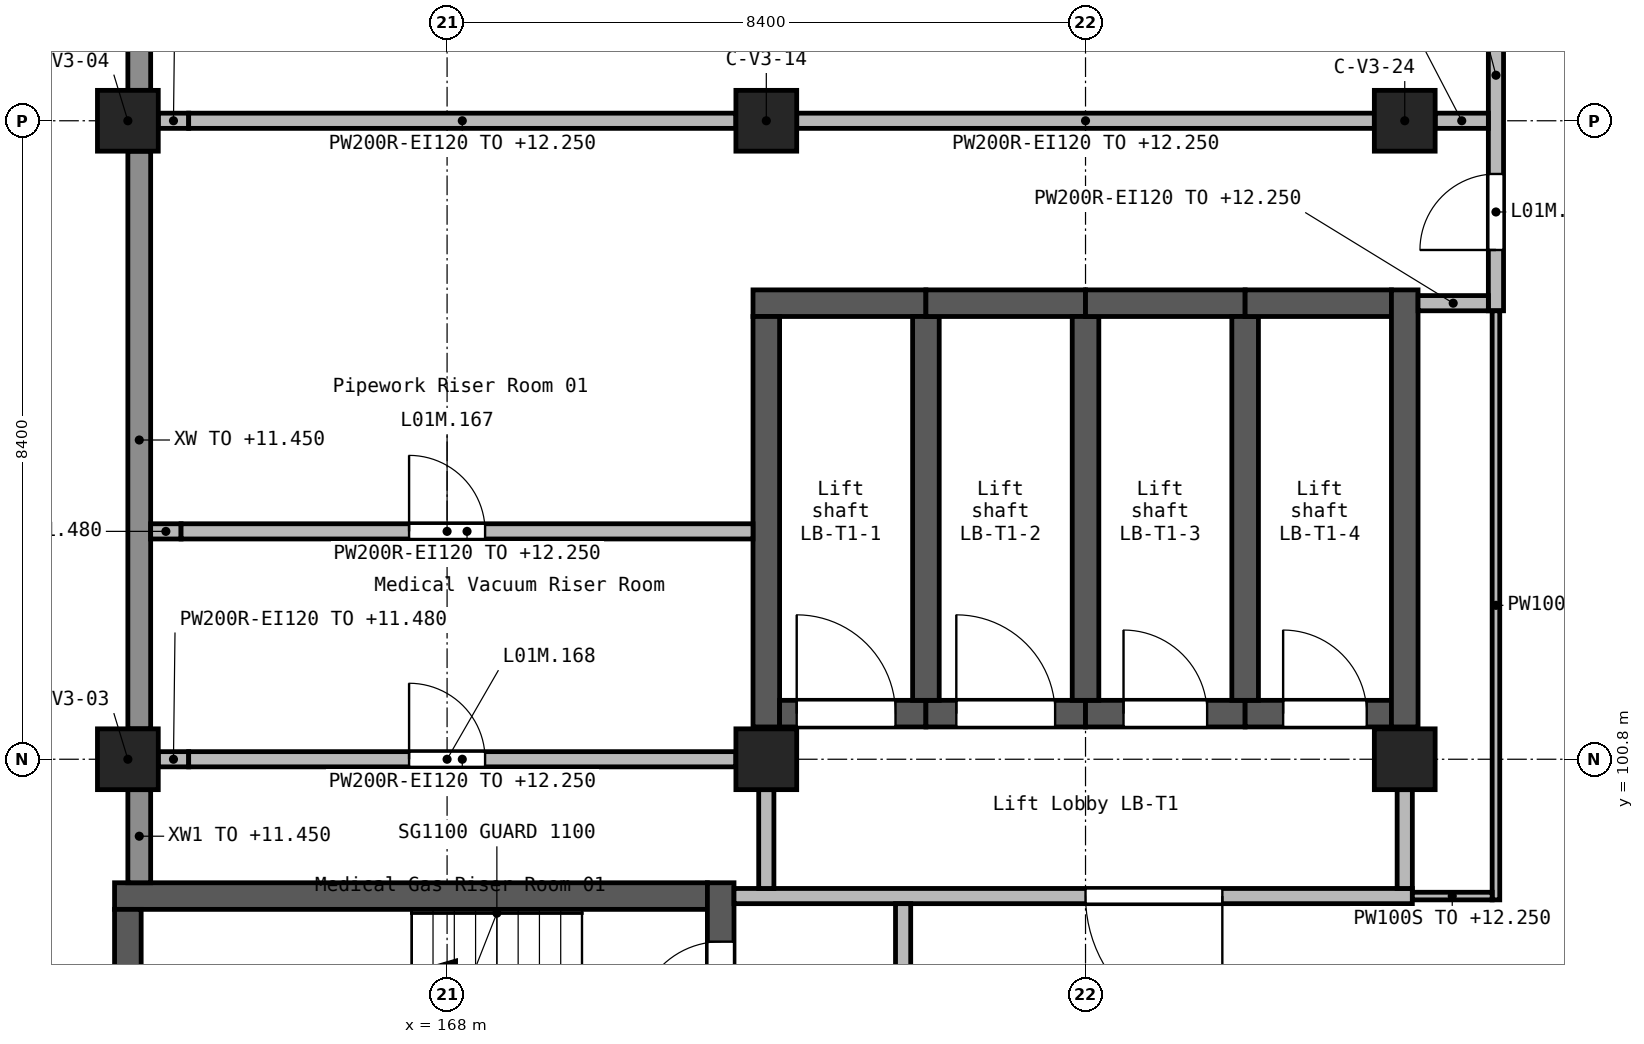
"""IFC4 building model, lengths in metres.
Left out: names, types, materials, properties, quantities, classifications, styles, units other than length and angle.
Written with IfcOpenShell. Run it as: python <this file> out.ifc"""

import sys

from ifc_helpers import new_model, si_unit, direction, frame, frame_2d, origin, origin_2d, place, context, subcontext, project, spatial, rectangle, extrude, element, fill, save


model = new_model("IFC4")
c1 = context("Model", 3, precision=1e-05, world=origin(), true_north=direction((0.0, 1.0)))
c2 = subcontext(c1, "Body", "Model", "MODEL_VIEW")
j1 = project(units=[si_unit("LENGTHUNIT", "METRE"), si_unit("PLANEANGLEUNIT", "RADIAN")], contexts=[c1])
p1 = place(None, origin())
s1 = spatial("IfcSite", under=j1, at=p1, CompositionType="ELEMENT")
p2 = place(p1, origin())
s2 = spatial("IfcBuilding", under=s1, at=p2, CompositionType="ELEMENT")
p3 = place(p2, frame((0.0, 0.0, 9.9)))
s3 = spatial("IfcBuildingStorey", under=s2, at=p3, CompositionType="ELEMENT", Elevation=9.9)
for number, where, z_axis, x_axis in (
    (1, (163.8, 100.8, 0.0), (0.0, 0.0, 1.0), (1.0, 0.0, 0.0)),
    (2, (163.8, 109.2, 0.0), (0.0, 0.0, 1.0), (1.0, 0.0, 0.0)),
    (3, (172.2, 100.8, 0.0), (0.0, 0.0, 1.0), (1.0, 0.0, 0.0)),
    (4, (172.2, 109.2, 0.0), (0.0, 0.0, 1.0), (1.0, 0.0, 0.0)),
    (5, (180.6, 100.8, 0.0), (0.0, 0.0, 1.0), (1.0, 0.0, 0.0)),
    (6, (180.6, 109.2, 0.0), (0.0, 0.0, 1.0), (1.0, 0.0, 0.0)),
):
    element("IfcColumn", number, at=place(p3, frame(where, z_axis=z_axis, x_axis=x_axis)), inside=s3, PredefinedType="COLUMN", context=c2, shape_type="SweptSolid", body=[
        extrude(rectangle(XDim=0.8, YDim=0.8, at=origin_2d()), origin(), (0.0, 0.0, 1.0), 2.7),
    ])
p4 = place(p3, frame((163.625, 99.0, 0.0), z_axis=(0.0, 0.0, 1.0), x_axis=(1.0, 0.0, 0.0)))
e7 = element("IfcWall", 7, at=p4, inside=s3, PredefinedType="SHEAR", context=c2, shape_type="SweptSolid", body=[
    extrude(rectangle(XDim=7.8, YDim=0.35, at=frame_2d((3.9, 0.0))), origin(), (0.0, 0.0, 1.0), 2.7),
])
p5 = place(p3, frame((163.8, 94.025, 0.0), z_axis=(0.0, 0.0, 1.0), x_axis=(0.0, 1.0, 0.0)))
e8 = element("IfcWall", 8, at=p5, inside=s3, PredefinedType="SHEAR", context=c2, shape_type="SweptSolid", body=[
    extrude(rectangle(XDim=4.8, YDim=0.35, at=frame_2d((2.4, 0.0))), origin(), (0.0, 0.0, 1.0), 2.7),
])
p6 = place(p3, frame((171.6, 94.025, 0.0), z_axis=(0.0, 0.0, 1.0), x_axis=(0.0, 1.0, 0.0)))
e9 = element("IfcWall", 9, at=p6, inside=s3, PredefinedType="SHEAR", context=c2, shape_type="SweptSolid", body=[
    extrude(rectangle(XDim=5.15, YDim=0.35, at=frame_2d((2.575, 0.0))), origin(), (0.0, 0.0, 1.0), 2.7),
])
p7 = place(p6, frame((3.275, 0.0, 0.0)))
e10 = element("IfcOpeningElement", 10, at=p7, cuts=e9, PredefinedType="OPENING", context=c2, shape_type="SweptSolid", body=[
    extrude(rectangle(XDim=1.1, YDim=2.1, at=frame_2d((0.55, 1.05))), frame((0.0, 0.185, 0.0), z_axis=(0.0, -1.0, 0.0), x_axis=(1.0, 0.0, 0.0)), (0.0, 0.0, 1.0), 0.37),
])
p8 = place(p3, frame((172.025, 106.8, 0.0), z_axis=(0.0, 0.0, 1.0), x_axis=(1.0, 0.0, 0.0)))
e11 = element("IfcWall", 11, at=p8, inside=s3, PredefinedType="SHEAR", context=c2, shape_type="SweptSolid", body=[
    extrude(rectangle(XDim=2.275, YDim=0.35, at=frame_2d((1.138, 0.0))), origin(), (0.0, 0.0, 1.0), 2.7),
])
p9 = place(p3, frame((172.2, 101.225, 0.0), z_axis=(0.0, 0.0, 1.0), x_axis=(0.0, 1.0, 0.0)))
e12 = element("IfcWall", 12, at=p9, inside=s3, PredefinedType="SHEAR", context=c2, shape_type="SweptSolid", body=[
    extrude(rectangle(XDim=5.4, YDim=0.35, at=frame_2d((2.7, 0.0))), origin(), (0.0, 0.0, 1.0), 2.7),
])
p10 = place(p3, frame((172.375, 101.4, 0.0), z_axis=(0.0, 0.0, 1.0), x_axis=(1.0, 0.0, 0.0)))
e13 = element("IfcWall", 13, at=p10, inside=s3, PredefinedType="SHEAR", context=c2, shape_type="SweptSolid", body=[
    extrude(rectangle(XDim=1.925, YDim=0.35, at=frame_2d((0.962, 0.0))), origin(), (0.0, 0.0, 1.0), 2.7),
])
p11 = place(p10, frame((0.225, 0.0, 0.0)))
e14 = element("IfcOpeningElement", 14, at=p11, cuts=e13, PredefinedType="OPENING", context=c2, shape_type="SweptSolid", body=[
    extrude(rectangle(XDim=1.3, YDim=2.1, at=frame_2d((0.65, 1.05))), frame((0.0, 0.185, 0.0), z_axis=(0.0, -1.0, 0.0), x_axis=(1.0, 0.0, 0.0)), (0.0, 0.0, 1.0), 0.37),
])
p12 = place(p3, frame((174.3, 101.4, 0.0), z_axis=(0.0, 0.0, 1.0), x_axis=(1.0, 0.0, 0.0)))
e15 = element("IfcWall", 15, at=p12, inside=s3, PredefinedType="SHEAR", context=c2, shape_type="SweptSolid", body=[
    extrude(rectangle(XDim=2.1, YDim=0.35, at=frame_2d((1.05, 0.0))), origin(), (0.0, 0.0, 1.0), 2.7),
])
p13 = place(p12, frame((0.4, 0.0, 0.0)))
e16 = element("IfcOpeningElement", 16, at=p13, cuts=e15, PredefinedType="OPENING", context=c2, shape_type="SweptSolid", body=[
    extrude(rectangle(XDim=1.3, YDim=2.1, at=frame_2d((0.65, 1.05))), frame((0.0, 0.185, 0.0), z_axis=(0.0, -1.0, 0.0), x_axis=(1.0, 0.0, 0.0)), (0.0, 0.0, 1.0), 0.37),
])
p14 = place(p3, frame((174.3, 101.575, 0.0), z_axis=(0.0, 0.0, 1.0), x_axis=(0.0, 1.0, 0.0)))
e17 = element("IfcWall", 17, at=p14, inside=s3, PredefinedType="SHEAR", context=c2, shape_type="SweptSolid", body=[
    extrude(rectangle(XDim=5.05, YDim=0.35, at=frame_2d((2.525, 0.0))), origin(), (0.0, 0.0, 1.0), 2.7),
])
p15 = place(p3, frame((174.3, 106.8, 0.0), z_axis=(0.0, 0.0, 1.0), x_axis=(1.0, 0.0, 0.0)))
e18 = element("IfcWall", 18, at=p15, inside=s3, PredefinedType="SHEAR", context=c2, shape_type="SweptSolid", body=[
    extrude(rectangle(XDim=2.1, YDim=0.35, at=frame_2d((1.05, 0.0))), origin(), (0.0, 0.0, 1.0), 2.7),
])
p16 = place(p3, frame((176.4, 101.4, 0.0), z_axis=(0.0, 0.0, 1.0), x_axis=(1.0, 0.0, 0.0)))
e19 = element("IfcWall", 19, at=p16, inside=s3, PredefinedType="SHEAR", context=c2, shape_type="SweptSolid", body=[
    extrude(rectangle(XDim=2.1, YDim=0.35, at=frame_2d((1.05, 0.0))), origin(), (0.0, 0.0, 1.0), 2.7),
])
p17 = place(p16, frame((0.5, 0.0, 0.0)))
e20 = element("IfcOpeningElement", 20, at=p17, cuts=e19, PredefinedType="OPENING", context=c2, shape_type="SweptSolid", body=[
    extrude(rectangle(XDim=1.1, YDim=2.1, at=frame_2d((0.55, 1.05))), frame((0.0, 0.185, 0.0), z_axis=(0.0, -1.0, 0.0), x_axis=(1.0, 0.0, 0.0)), (0.0, 0.0, 1.0), 0.37),
])
p18 = place(p3, frame((176.4, 101.575, 0.0), z_axis=(0.0, 0.0, 1.0), x_axis=(0.0, 1.0, 0.0)))
e21 = element("IfcWall", 21, at=p18, inside=s3, PredefinedType="SHEAR", context=c2, shape_type="SweptSolid", body=[
    extrude(rectangle(XDim=5.05, YDim=0.35, at=frame_2d((2.525, 0.0))), origin(), (0.0, 0.0, 1.0), 2.7),
])
p19 = place(p3, frame((176.4, 106.8, 0.0), z_axis=(0.0, 0.0, 1.0), x_axis=(1.0, 0.0, 0.0)))
e22 = element("IfcWall", 22, at=p19, inside=s3, PredefinedType="SHEAR", context=c2, shape_type="SweptSolid", body=[
    extrude(rectangle(XDim=2.1, YDim=0.35, at=frame_2d((1.05, 0.0))), origin(), (0.0, 0.0, 1.0), 2.7),
])
p20 = place(p3, frame((178.5, 101.4, 0.0), z_axis=(0.0, 0.0, 1.0), x_axis=(1.0, 0.0, 0.0)))
e23 = element("IfcWall", 23, at=p20, inside=s3, PredefinedType="SHEAR", context=c2, shape_type="SweptSolid", body=[
    extrude(rectangle(XDim=1.925, YDim=0.35, at=frame_2d((0.962, 0.0))), origin(), (0.0, 0.0, 1.0), 2.7),
])
p21 = place(p20, frame((0.5, 0.0, 0.0)))
e24 = element("IfcOpeningElement", 24, at=p21, cuts=e23, PredefinedType="OPENING", context=c2, shape_type="SweptSolid", body=[
    extrude(rectangle(XDim=1.1, YDim=2.1, at=frame_2d((0.55, 1.05))), frame((0.0, 0.185, 0.0), z_axis=(0.0, -1.0, 0.0), x_axis=(1.0, 0.0, 0.0)), (0.0, 0.0, 1.0), 0.37),
])
p22 = place(p3, frame((178.5, 101.575, 0.0), z_axis=(0.0, 0.0, 1.0), x_axis=(0.0, 1.0, 0.0)))
e25 = element("IfcWall", 25, at=p22, inside=s3, PredefinedType="SHEAR", context=c2, shape_type="SweptSolid", body=[
    extrude(rectangle(XDim=5.05, YDim=0.35, at=frame_2d((2.525, 0.0))), origin(), (0.0, 0.0, 1.0), 2.7),
])
p23 = place(p3, frame((178.5, 106.8, 0.0), z_axis=(0.0, 0.0, 1.0), x_axis=(1.0, 0.0, 0.0)))
e26 = element("IfcWall", 26, at=p23, inside=s3, PredefinedType="SHEAR", context=c2, shape_type="SweptSolid", body=[
    extrude(rectangle(XDim=1.925, YDim=0.35, at=frame_2d((0.962, 0.0))), origin(), (0.0, 0.0, 1.0), 2.7),
])
p24 = place(p3, frame((180.6, 101.225, 0.0), z_axis=(0.0, 0.0, 1.0), x_axis=(0.0, 1.0, 0.0)))
e27 = element("IfcWall", 27, at=p24, inside=s3, PredefinedType="SHEAR", context=c2, shape_type="SweptSolid", body=[
    extrude(rectangle(XDim=5.75, YDim=0.35, at=frame_2d((2.875, 0.0))), origin(), (0.0, 0.0, 1.0), 2.7),
])
p25 = place(p3, frame((163.95, 117.54, 0.0), z_axis=(0.0, 0.0, 1.0), x_axis=(0.0, -1.0, 0.0)))
e28 = element("IfcWall", 28, at=p25, inside=s3, PredefinedType="STANDARD", context=c2, shape_type="SweptSolid", body=[
    extrude(rectangle(XDim=7.94, YDim=0.3, at=frame_2d((3.97, 0.0))), origin(), (0.0, 0.0, 1.0), 1.55),
])
p26 = place(p3, frame((163.95, 108.8, 0.0), z_axis=(0.0, 0.0, 1.0), x_axis=(0.0, -1.0, 0.0)))
e29 = element("IfcWall", 29, at=p26, inside=s3, PredefinedType="STANDARD", context=c2, shape_type="SweptSolid", body=[
    extrude(rectangle(XDim=7.6, YDim=0.3, at=frame_2d((3.8, 0.0))), origin(), (0.0, 0.0, 1.0), 1.55),
])
p27 = place(p3, frame((163.95, 100.4, 0.0), z_axis=(0.0, 0.0, 1.0), x_axis=(0.0, -1.0, 0.0)))
e30 = element("IfcWall", 30, at=p27, inside=s3, PredefinedType="STANDARD", context=c2, shape_type="SweptSolid", body=[
    extrude(rectangle(XDim=1.225, YDim=0.3, at=frame_2d((0.612, 0.0))), origin(), (0.0, 0.0, 1.0), 1.55),
])
p28 = place(p3, frame((181.8, 106.7, 0.0), z_axis=(0.0, 0.0, 1.0), x_axis=(0.0, 1.0, 0.0)))
e31 = element("IfcWall", 31, at=p28, inside=s3, PredefinedType="SOLIDWALL", context=c2, shape_type="SweptSolid", body=[
    extrude(rectangle(XDim=6.198, YDim=0.2, at=frame_2d((3.099, 0.0))), origin(), (0.0, 0.0, 1.0), 2.35),
])
p29 = place(p28, frame((0.8, 0.0, 0.0)))
e32 = element("IfcOpeningElement", 32, at=p29, cuts=e31, PredefinedType="OPENING", context=c2, shape_type="SweptSolid", body=[
    extrude(rectangle(XDim=1.0, YDim=2.1, at=frame_2d((0.5, 1.05))), frame((0.0, 0.11, 0.0), z_axis=(0.0, -1.0, 0.0), x_axis=(1.0, 0.0, 0.0)), (0.0, 0.0, 1.0), 0.22),
])
p30 = place(p28, frame((3.799, 0.0, 0.0)))
e33 = element("IfcOpeningElement", 33, at=p30, cuts=e31, PredefinedType="OPENING", context=c2, shape_type="SweptSolid", body=[
    extrude(rectangle(XDim=1.0, YDim=2.1, at=frame_2d((0.5, 1.05))), frame((0.0, 0.11, 0.0), z_axis=(0.0, -1.0, 0.0), x_axis=(1.0, 0.0, 0.0)), (0.0, 0.0, 1.0), 0.22),
])
p31 = place(p3, frame((164.2, 109.2, 0.0), z_axis=(0.0, 0.0, 1.0), x_axis=(1.0, 0.0, 0.0)))
e34 = element("IfcWall", 34, at=p31, inside=s3, PredefinedType="SOLIDWALL", context=c2, shape_type="SweptSolid", body=[
    extrude(rectangle(XDim=0.4, YDim=0.2, at=frame_2d((0.2, 0.0))), origin(), (0.0, 0.0, 1.0), 1.58),
])
p32 = place(p3, frame((164.6, 109.2, 0.0), z_axis=(0.0, 0.0, 1.0), x_axis=(1.0, 0.0, 0.0)))
e35 = element("IfcWall", 35, at=p32, inside=s3, PredefinedType="SOLIDWALL", context=c2, shape_type="SweptSolid", body=[
    extrude(rectangle(XDim=7.2, YDim=0.2, at=frame_2d((3.6, 0.0))), origin(), (0.0, 0.0, 1.0), 2.35),
])
p33 = place(p3, frame((172.6, 109.2, 0.0), z_axis=(0.0, 0.0, 1.0), x_axis=(1.0, 0.0, 0.0)))
e36 = element("IfcWall", 36, at=p33, inside=s3, PredefinedType="SOLIDWALL", context=c2, shape_type="SweptSolid", body=[
    extrude(rectangle(XDim=7.6, YDim=0.2, at=frame_2d((3.8, 0.0))), origin(), (0.0, 0.0, 1.0), 2.35),
])
p34 = place(p3, frame((181.0, 109.2, 0.0), z_axis=(0.0, 0.0, 1.0), x_axis=(1.0, 0.0, 0.0)))
e37 = element("IfcWall", 37, at=p34, inside=s3, PredefinedType="SOLIDWALL", context=c2, shape_type="SweptSolid", body=[
    extrude(rectangle(XDim=0.7, YDim=0.2, at=frame_2d((0.35, 0.0))), origin(), (0.0, 0.0, 1.0), 2.35),
])
p35 = place(p3, frame((180.7, 99.0, 0.0), z_axis=(0.0, 0.0, 1.0), x_axis=(-1.0, 0.0, 0.0)))
e38 = element("IfcWall", 38, at=p35, inside=s3, PredefinedType="SOLIDWALL", context=c2, shape_type="SweptSolid", body=[
    extrude(rectangle(XDim=8.925, YDim=0.2, at=frame_2d((4.462, 0.0))), origin(), (0.0, 0.0, 1.0), 2.35),
])
p36 = place(p35, frame((2.5, 0.0, 0.0)))
e39 = element("IfcOpeningElement", 39, at=p36, cuts=e38, PredefinedType="OPENING", context=c2, shape_type="SweptSolid", body=[
    extrude(rectangle(XDim=1.8, YDim=2.1, at=frame_2d((0.9, 1.05))), frame((0.0, 0.11, 0.0), z_axis=(0.0, -1.0, 0.0), x_axis=(1.0, 0.0, 0.0)), (0.0, 0.0, 1.0), 0.22),
])
p37 = place(p3, frame((180.775, 106.8, 0.0), z_axis=(0.0, 0.0, 1.0), x_axis=(1.0, 0.0, 0.0)))
e40 = element("IfcWall", 40, at=p37, inside=s3, PredefinedType="SOLIDWALL", context=c2, shape_type="SweptSolid", body=[
    extrude(rectangle(XDim=0.925, YDim=0.2, at=frame_2d((0.462, 0.0))), origin(), (0.0, 0.0, 1.0), 2.35),
])
p38 = place(p3, frame((172.2, 100.4, 0.0), z_axis=(0.0, 0.0, 1.0), x_axis=(0.0, -1.0, 0.0)))
e41 = element("IfcWall", 41, at=p38, inside=s3, PredefinedType="SOLIDWALL", context=c2, shape_type="SweptSolid", body=[
    extrude(rectangle(XDim=1.3, YDim=0.2, at=frame_2d((0.65, 0.0))), origin(), (0.0, 0.0, 1.0), 2.35),
])
p39 = place(p3, frame((164.2, 100.8, 0.0), z_axis=(0.0, 0.0, 1.0), x_axis=(1.0, 0.0, 0.0)))
e42 = element("IfcWall", 42, at=p39, inside=s3, PredefinedType="SOLIDWALL", context=c2, shape_type="SweptSolid", body=[
    extrude(rectangle(XDim=0.4, YDim=0.2, at=frame_2d((0.2, 0.0))), origin(), (0.0, 0.0, 1.0), 1.58),
])
p40 = place(p3, frame((164.6, 100.8, 0.0), z_axis=(0.0, 0.0, 1.0), x_axis=(1.0, 0.0, 0.0)))
e43 = element("IfcWall", 43, at=p40, inside=s3, PredefinedType="SOLIDWALL", context=c2, shape_type="SweptSolid", body=[
    extrude(rectangle(XDim=7.2, YDim=0.2, at=frame_2d((3.6, 0.0))), origin(), (0.0, 0.0, 1.0), 2.35),
])
p41 = place(p40, frame((2.9, 0.0, 0.0)))
e44 = element("IfcOpeningElement", 44, at=p41, cuts=e43, PredefinedType="OPENING", context=c2, shape_type="SweptSolid", body=[
    extrude(rectangle(XDim=1.0, YDim=2.1, at=frame_2d((0.5, 1.05))), frame((0.0, 0.11, 0.0), z_axis=(0.0, -1.0, 0.0), x_axis=(1.0, 0.0, 0.0)), (0.0, 0.0, 1.0), 0.22),
])
p42 = place(p3, frame((164.1, 103.798, 0.0), z_axis=(0.0, 0.0, 1.0), x_axis=(1.0, 0.0, 0.0)))
e45 = element("IfcWall", 45, at=p42, inside=s3, PredefinedType="SOLIDWALL", context=c2, shape_type="SweptSolid", body=[
    extrude(rectangle(XDim=0.4, YDim=0.2, at=frame_2d((0.2, 0.0))), origin(), (0.0, 0.0, 1.0), 1.58),
])
p43 = place(p3, frame((164.5, 103.798, 0.0), z_axis=(0.0, 0.0, 1.0), x_axis=(1.0, 0.0, 0.0)))
e46 = element("IfcWall", 46, at=p43, inside=s3, PredefinedType="SOLIDWALL", context=c2, shape_type="SweptSolid", body=[
    extrude(rectangle(XDim=7.525, YDim=0.2, at=frame_2d((3.762, 0.0))), origin(), (0.0, 0.0, 1.0), 2.35),
])
p44 = place(p43, frame((3.0, 0.0, 0.0)))
e47 = element("IfcOpeningElement", 47, at=p44, cuts=e46, PredefinedType="OPENING", context=c2, shape_type="SweptSolid", body=[
    extrude(rectangle(XDim=1.0, YDim=2.1, at=frame_2d((0.5, 1.05))), frame((0.0, 0.11, 0.0), z_axis=(0.0, -1.0, 0.0), x_axis=(1.0, 0.0, 0.0)), (0.0, 0.0, 1.0), 0.22),
])
p45 = place(p3, frame((174.0, 94.1, 0.0), z_axis=(0.0, 0.0, 1.0), x_axis=(0.0, 1.0, 0.0)))
e48 = element("IfcWall", 48, at=p45, inside=s3, PredefinedType="SOLIDWALL", context=c2, shape_type="SweptSolid", body=[
    extrude(rectangle(XDim=4.8, YDim=0.2, at=frame_2d((2.4, 0.0))), origin(), (0.0, 0.0, 1.0), 2.35),
])
p46 = place(p45, frame((1.95, 0.0, 0.0)))
e49 = element("IfcOpeningElement", 49, at=p46, cuts=e48, PredefinedType="OPENING", context=c2, shape_type="SweptSolid", body=[
    extrude(rectangle(XDim=1.1, YDim=2.1, at=frame_2d((0.55, 1.05))), frame((0.0, 0.11, 0.0), z_axis=(0.0, -1.0, 0.0), x_axis=(1.0, 0.0, 0.0)), (0.0, 0.0, 1.0), 0.22),
])
p47 = place(p3, frame((180.6, 99.1, 0.0), z_axis=(0.0, 0.0, 1.0), x_axis=(0.0, 1.0, 0.0)))
e50 = element("IfcWall", 50, at=p47, inside=s3, PredefinedType="SOLIDWALL", context=c2, shape_type="SweptSolid", body=[
    extrude(rectangle(XDim=1.3, YDim=0.2, at=frame_2d((0.65, 0.0))), origin(), (0.0, 0.0, 1.0), 2.35),
])
p48 = place(p3, frame((181.8, 98.95, 0.0), z_axis=(0.0, 0.0, 1.0), x_axis=(0.0, 1.0, 0.0)))
e51 = element("IfcWall", 51, at=p48, inside=s3, PredefinedType="PARTITIONING", context=c2, shape_type="SweptSolid", body=[
    extrude(rectangle(XDim=7.75, YDim=0.1, at=frame_2d((3.875, 0.0))), origin(), (0.0, 0.0, 1.0), 2.35),
])
p49 = place(p3, frame((180.7, 99.0, 0.0), z_axis=(0.0, 0.0, 1.0), x_axis=(1.0, 0.0, 0.0)))
e52 = element("IfcWall", 52, at=p49, inside=s3, PredefinedType="PARTITIONING", context=c2, shape_type="SweptSolid", body=[
    extrude(rectangle(XDim=1.05, YDim=0.1, at=frame_2d((0.525, 0.0))), origin(), (0.0, 0.0, 1.0), 2.35),
])
p50 = place(p11, origin())
e53 = element("IfcDoor", 53, at=p50, inside=s3, OperationType="DOUBLE_DOOR_SLIDING", PredefinedType="DOOR", context=c2, shape_type="SweptSolid", body=[
    extrude(rectangle(XDim=1.3, YDim=2.1, at=frame_2d((0.65, 1.05))), frame((0.0, 0.025, 0.0), z_axis=(0.0, -1.0, 0.0), x_axis=(1.0, 0.0, 0.0)), (0.0, 0.0, 1.0), 0.05),
])
fill(e14, e53)
p51 = place(p13, origin())
e54 = element("IfcDoor", 54, at=p51, inside=s3, OperationType="DOUBLE_DOOR_SLIDING", PredefinedType="DOOR", context=c2, shape_type="SweptSolid", body=[
    extrude(rectangle(XDim=1.3, YDim=2.1, at=frame_2d((0.65, 1.05))), frame((0.0, 0.025, 0.0), z_axis=(0.0, -1.0, 0.0), x_axis=(1.0, 0.0, 0.0)), (0.0, 0.0, 1.0), 0.05),
])
fill(e16, e54)
p52 = place(p17, origin())
e55 = element("IfcDoor", 55, at=p52, inside=s3, OperationType="DOUBLE_DOOR_SLIDING", PredefinedType="DOOR", context=c2, shape_type="SweptSolid", body=[
    extrude(rectangle(XDim=1.1, YDim=2.1, at=frame_2d((0.55, 1.05))), frame((0.0, 0.025, 0.0), z_axis=(0.0, -1.0, 0.0), x_axis=(1.0, 0.0, 0.0)), (0.0, 0.0, 1.0), 0.05),
])
fill(e20, e55)
p53 = place(p21, origin())
e56 = element("IfcDoor", 56, at=p53, inside=s3, OperationType="DOUBLE_DOOR_SLIDING", PredefinedType="DOOR", context=c2, shape_type="SweptSolid", body=[
    extrude(rectangle(XDim=1.1, YDim=2.1, at=frame_2d((0.55, 1.05))), frame((0.0, 0.025, 0.0), z_axis=(0.0, -1.0, 0.0), x_axis=(1.0, 0.0, 0.0)), (0.0, 0.0, 1.0), 0.05),
])
fill(e24, e56)
p54 = place(p7, origin())
e57 = element("IfcDoor", 57, at=p54, inside=s3, OperationType="SINGLE_SWING_RIGHT", PredefinedType="DOOR", context=c2, shape_type="SweptSolid", body=[
    extrude(rectangle(XDim=1.1, YDim=2.1, at=frame_2d((0.55, 1.05))), frame((0.0, 0.025, 0.0), z_axis=(0.0, -1.0, 0.0), x_axis=(1.0, 0.0, 0.0)), (0.0, 0.0, 1.0), 0.05),
])
fill(e10, e57)
p55 = place(p36, frame((1.8, 0.0, 0.0), z_axis=(0.0, 0.0, 1.0), x_axis=(-1.0, 0.0, 0.0)))
e58 = element("IfcDoor", 58, at=p55, inside=s3, OperationType="DOUBLE_DOOR_SINGLE_SWING", PredefinedType="DOOR", context=c2, shape_type="SweptSolid", body=[
    extrude(rectangle(XDim=1.8, YDim=2.1, at=frame_2d((0.9, 1.05))), frame((0.0, 0.025, 0.0), z_axis=(0.0, -1.0, 0.0), x_axis=(1.0, 0.0, 0.0)), (0.0, 0.0, 1.0), 0.05),
])
fill(e39, e58)
p56 = place(p29, origin())
e59 = element("IfcDoor", 59, at=p56, inside=s3, OperationType="SINGLE_SWING_LEFT", PredefinedType="DOOR", context=c2, shape_type="SweptSolid", body=[
    extrude(rectangle(XDim=1.0, YDim=2.1, at=frame_2d((0.5, 1.05))), frame((0.0, 0.025, 0.0), z_axis=(0.0, -1.0, 0.0), x_axis=(1.0, 0.0, 0.0)), (0.0, 0.0, 1.0), 0.05),
])
fill(e32, e59)
p57 = place(p44, frame((1.0, 0.0, 0.0), z_axis=(0.0, 0.0, 1.0), x_axis=(-1.0, 0.0, 0.0)))
e60 = element("IfcDoor", 60, at=p57, inside=s3, OperationType="SINGLE_SWING_RIGHT", PredefinedType="DOOR", context=c2, shape_type="SweptSolid", body=[
    extrude(rectangle(XDim=1.0, YDim=2.1, at=frame_2d((0.5, 1.05))), frame((0.0, 0.025, 0.0), z_axis=(0.0, -1.0, 0.0), x_axis=(1.0, 0.0, 0.0)), (0.0, 0.0, 1.0), 0.05),
])
fill(e47, e60)
p58 = place(p41, frame((1.0, 0.0, 0.0), z_axis=(0.0, 0.0, 1.0), x_axis=(-1.0, 0.0, 0.0)))
e61 = element("IfcDoor", 61, at=p58, inside=s3, OperationType="SINGLE_SWING_RIGHT", PredefinedType="DOOR", context=c2, shape_type="SweptSolid", body=[
    extrude(rectangle(XDim=1.0, YDim=2.1, at=frame_2d((0.5, 1.05))), frame((0.0, 0.025, 0.0), z_axis=(0.0, -1.0, 0.0), x_axis=(1.0, 0.0, 0.0)), (0.0, 0.0, 1.0), 0.05),
])
fill(e44, e61)
save(model, sys.argv[1])
